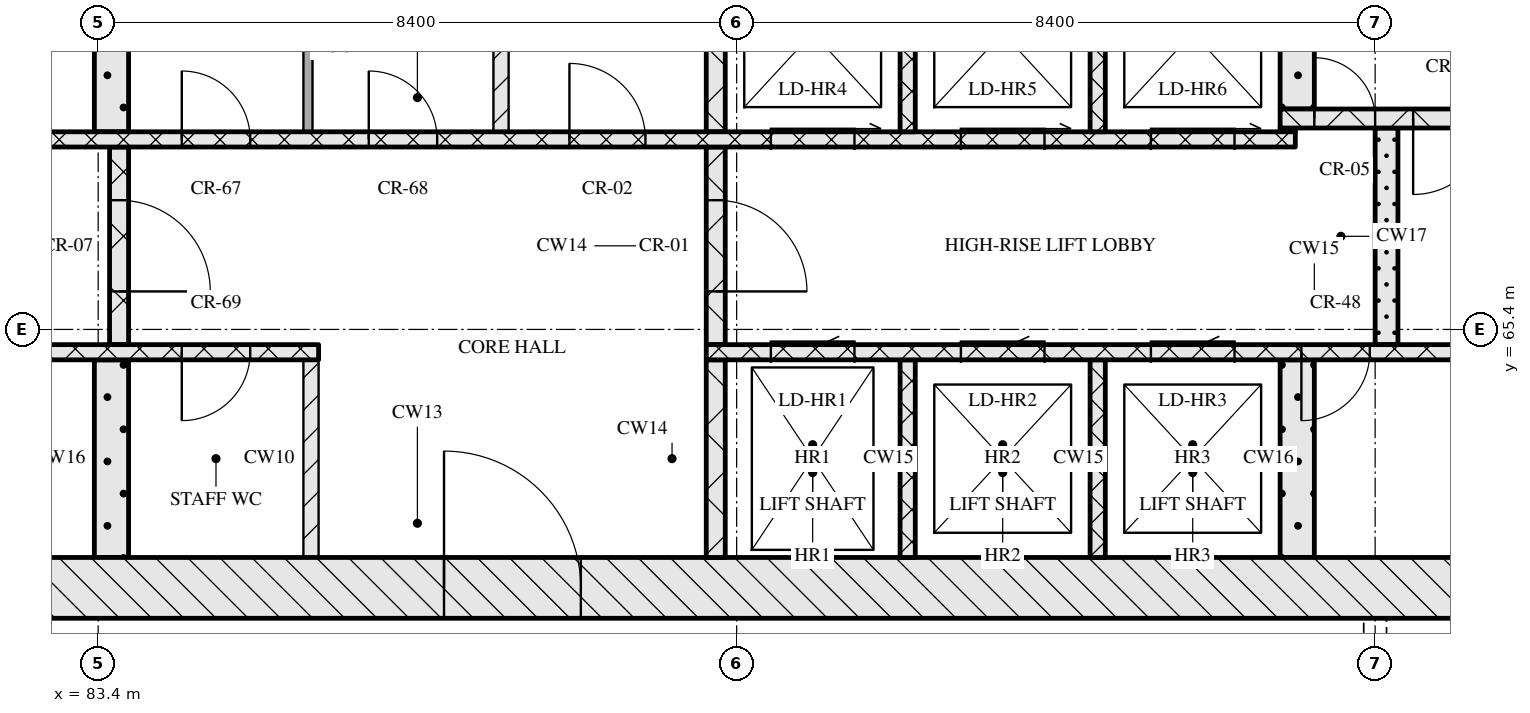
"""IFC4 building model, lengths in metres.
Left out: names, types, materials, properties, quantities, classifications, styles, units other than length and angle.
Written with IfcOpenShell. Run it as: python <this file> out.ifc"""

import sys

from ifc_helpers import new_model, si_unit, direction, frame, frame_2d, origin, place, context, subcontext, project, spatial, rectangle, extrude, element, fill, save


model = new_model("IFC4")
c1 = context("Model", 3, precision=1e-05, world=origin(), true_north=direction((0.0, 1.0)))
c2 = subcontext(c1, "Body", "Model", "MODEL_VIEW")
j1 = project(units=[si_unit("LENGTHUNIT", "METRE"), si_unit("PLANEANGLEUNIT", "RADIAN")], contexts=[c1])
p1 = place(None, origin())
s1 = spatial("IfcSite", under=j1, at=p1, CompositionType="ELEMENT")
p2 = place(p1, origin())
s2 = spatial("IfcBuilding", under=s1, at=p2, CompositionType="ELEMENT")
p3 = place(p2, frame((0.0, 0.0, 169.05)))
s3 = spatial("IfcBuildingStorey", under=s2, at=p3, CompositionType="ELEMENT", Elevation=169.05)
p4 = place(p3, frame((67.0, 62.0, 0.0), z_axis=(0.0, 0.0, 1.0), x_axis=(1.0, 0.0, 0.0)))
e1 = element("IfcWall", 1, at=p4, inside=s3, PredefinedType="SOLIDWALL", context=c2, shape_type="SweptSolid", body=[
    extrude(rectangle(XDim=41.2, YDim=0.8, at=frame_2d((20.6, 0.0))), origin(), (0.0, 0.0, 1.0), 3.32),
])
p5 = place(p4, frame((20.95, 0.0, 0.0)))
e2 = element("IfcOpeningElement", 2, at=p5, cuts=e1, PredefinedType="OPENING", context=c2, shape_type="SweptSolid", body=[
    extrude(rectangle(XDim=1.8, YDim=2.1, at=frame_2d((0.9, 1.05))), frame((0.0, 0.41, 0.0), z_axis=(0.0, -1.0, 0.0), x_axis=(1.0, 0.0, 0.0)), (0.0, 0.0, 1.0), 0.82),
])
p6 = place(p3, frame((83.575, 62.4, 0.0), z_axis=(0.0, 0.0, 1.0), x_axis=(0.0, 1.0, 0.0)))
e3 = element("IfcWall", 3, at=p6, inside=s3, PredefinedType="SOLIDWALL", context=c2, shape_type="SweptSolid", body=[
    extrude(rectangle(XDim=2.6, YDim=0.45, at=frame_2d((1.3, 0.0))), origin(), (0.0, 0.0, 1.0), 3.32),
])
p7 = place(p3, frame((86.2, 62.4, 0.0), z_axis=(0.0, 0.0, 1.0), x_axis=(0.0, 1.0, 0.0)))
e4 = element("IfcWall", 4, at=p7, inside=s3, PredefinedType="PARTITIONING", context=c2, shape_type="SweptSolid", body=[
    extrude(rectangle(XDim=2.6, YDim=0.2, at=frame_2d((1.3, 0.0))), origin(), (0.0, 0.0, 1.0), 3.32),
])
p8 = place(p3, frame((91.525, 62.4, 0.0), z_axis=(0.0, 0.0, 1.0), x_axis=(0.0, 1.0, 0.0)))
e5 = element("IfcWall", 5, at=p8, inside=s3, PredefinedType="SOLIDWALL", context=c2, shape_type="SweptSolid", body=[
    extrude(rectangle(XDim=2.6, YDim=0.25, at=frame_2d((1.3, 0.0))), origin(), (0.0, 0.0, 1.0), 3.32),
])
for number, where, z_axis, x_axis in (
    (6, (94.05, 62.4, 0.0), (0.0, 0.0, 1.0), (0.0, 1.0, 0.0)),
    (7, (96.55, 62.4, 0.0), (0.0, 0.0, 1.0), (0.0, 1.0, 0.0)),
):
    element("IfcWall", number, at=place(p3, frame(where, z_axis=z_axis, x_axis=x_axis)), inside=s3, PredefinedType="SOLIDWALL", context=c2, shape_type="SweptSolid", body=[
        extrude(rectangle(XDim=2.6, YDim=0.2, at=frame_2d((1.3, 0.0))), origin(), (0.0, 0.0, 1.0), 3.32),
    ])
p9 = place(p3, frame((99.175, 62.4, 0.0), z_axis=(0.0, 0.0, 1.0), x_axis=(0.0, 1.0, 0.0)))
e8 = element("IfcWall", 8, at=p9, inside=s3, PredefinedType="SOLIDWALL", context=c2, shape_type="SweptSolid", body=[
    extrude(rectangle(XDim=2.6, YDim=0.45, at=frame_2d((1.3, 0.0))), origin(), (0.0, 0.0, 1.0), 3.32),
])
p10 = place(p3, frame((67.8, 65.1, 0.0), z_axis=(0.0, 0.0, 1.0), x_axis=(1.0, 0.0, 0.0)))
e9 = element("IfcWall", 9, at=p10, inside=s3, PredefinedType="SOLIDWALL", context=c2, shape_type="SweptSolid", body=[
    extrude(rectangle(XDim=18.5, YDim=0.2, at=frame_2d((9.25, 0.0))), origin(), (0.0, 0.0, 1.0), 3.32),
])
p11 = place(p10, frame((7.27, 0.0, 0.0)))
e10 = element("IfcOpeningElement", 10, at=p11, cuts=e9, PredefinedType="OPENING", context=c2, shape_type="SweptSolid", body=[
    extrude(rectangle(XDim=0.9, YDim=2.1, at=frame_2d((0.45, 1.05))), frame((0.0, 0.11, 0.0), z_axis=(0.0, -1.0, 0.0), x_axis=(1.0, 0.0, 0.0)), (0.0, 0.0, 1.0), 0.22),
])
p12 = place(p10, frame((9.05, 0.0, 0.0)))
e11 = element("IfcOpeningElement", 11, at=p12, cuts=e9, PredefinedType="OPENING", context=c2, shape_type="SweptSolid", body=[
    extrude(rectangle(XDim=0.9, YDim=2.1, at=frame_2d((0.45, 1.05))), frame((0.0, 0.11, 0.0), z_axis=(0.0, -1.0, 0.0), x_axis=(1.0, 0.0, 0.0)), (0.0, 0.0, 1.0), 0.22),
])
p13 = place(p10, frame((12.76, 0.0, 0.0)))
e12 = element("IfcOpeningElement", 12, at=p13, cuts=e9, PredefinedType="OPENING", context=c2, shape_type="SweptSolid", body=[
    extrude(rectangle(XDim=0.9, YDim=2.1, at=frame_2d((0.45, 1.05))), frame((0.0, 0.11, 0.0), z_axis=(0.0, -1.0, 0.0), x_axis=(1.0, 0.0, 0.0)), (0.0, 0.0, 1.0), 0.22),
])
p14 = place(p10, frame((16.7, 0.0, 0.0)))
e13 = element("IfcOpeningElement", 13, at=p14, cuts=e9, PredefinedType="OPENING", context=c2, shape_type="SweptSolid", body=[
    extrude(rectangle(XDim=0.9, YDim=2.1, at=frame_2d((0.45, 1.05))), frame((0.0, 0.11, 0.0), z_axis=(0.0, -1.0, 0.0), x_axis=(1.0, 0.0, 0.0)), (0.0, 0.0, 1.0), 0.22),
])
p15 = place(p3, frame((91.4, 65.1, 0.0), z_axis=(0.0, 0.0, 1.0), x_axis=(1.0, 0.0, 0.0)))
e14 = element("IfcWall", 14, at=p15, inside=s3, PredefinedType="SOLIDWALL", context=c2, shape_type="SweptSolid", body=[
    extrude(rectangle(XDim=16.0, YDim=0.2, at=frame_2d((8.0, 0.0))), origin(), (0.0, 0.0, 1.0), 3.32),
])
p16 = place(p15, frame((0.85, 0.0, 0.0)))
e15 = element("IfcOpeningElement", 15, at=p16, cuts=e14, PredefinedType="OPENING", context=c2, shape_type="SweptSolid", body=[
    extrude(rectangle(XDim=1.1, YDim=2.1, at=frame_2d((0.55, 1.05))), frame((0.0, 0.11, 0.0), z_axis=(0.0, -1.0, 0.0), x_axis=(1.0, 0.0, 0.0)), (0.0, 0.0, 1.0), 0.22),
])
p17 = place(p15, frame((3.35, 0.0, 0.0)))
e16 = element("IfcOpeningElement", 16, at=p17, cuts=e14, PredefinedType="OPENING", context=c2, shape_type="SweptSolid", body=[
    extrude(rectangle(XDim=1.1, YDim=2.1, at=frame_2d((0.55, 1.05))), frame((0.0, 0.11, 0.0), z_axis=(0.0, -1.0, 0.0), x_axis=(1.0, 0.0, 0.0)), (0.0, 0.0, 1.0), 0.22),
])
p18 = place(p15, frame((5.85, 0.0, 0.0)))
e17 = element("IfcOpeningElement", 17, at=p18, cuts=e14, PredefinedType="OPENING", context=c2, shape_type="SweptSolid", body=[
    extrude(rectangle(XDim=1.1, YDim=2.1, at=frame_2d((0.55, 1.05))), frame((0.0, 0.11, 0.0), z_axis=(0.0, -1.0, 0.0), x_axis=(1.0, 0.0, 0.0)), (0.0, 0.0, 1.0), 0.22),
])
p19 = place(p15, frame((7.83, 0.0, 0.0)))
e18 = element("IfcOpeningElement", 18, at=p19, cuts=e14, PredefinedType="OPENING", context=c2, shape_type="SweptSolid", body=[
    extrude(rectangle(XDim=0.9, YDim=2.1, at=frame_2d((0.45, 1.05))), frame((0.0, 0.11, 0.0), z_axis=(0.0, -1.0, 0.0), x_axis=(1.0, 0.0, 0.0)), (0.0, 0.0, 1.0), 0.22),
])
p20 = place(p3, frame((83.675, 65.2, 0.0), z_axis=(0.0, 0.0, 1.0), x_axis=(0.0, 1.0, 0.0)))
e19 = element("IfcWall", 19, at=p20, inside=s3, PredefinedType="SOLIDWALL", context=c2, shape_type="SweptSolid", body=[
    extrude(rectangle(XDim=2.6, YDim=0.25, at=frame_2d((1.3, 0.0))), origin(), (0.0, 0.0, 1.0), 3.32),
])
p21 = place(p20, frame((0.7, 0.0, 0.0)))
e20 = element("IfcOpeningElement", 20, at=p21, cuts=e19, PredefinedType="OPENING", context=c2, shape_type="SweptSolid", body=[
    extrude(rectangle(XDim=1.2, YDim=2.1, at=frame_2d((0.6, 1.05))), frame((0.0, 0.135, 0.0), z_axis=(0.0, -1.0, 0.0), x_axis=(1.0, 0.0, 0.0)), (0.0, 0.0, 1.0), 0.27),
])
p22 = place(p3, frame((91.525, 65.2, 0.0), z_axis=(0.0, 0.0, 1.0), x_axis=(0.0, 1.0, 0.0)))
e21 = element("IfcWall", 21, at=p22, inside=s3, PredefinedType="SOLIDWALL", context=c2, shape_type="SweptSolid", body=[
    extrude(rectangle(XDim=2.6, YDim=0.25, at=frame_2d((1.3, 0.0))), origin(), (0.0, 0.0, 1.0), 3.32),
])
p23 = place(p22, frame((0.7, 0.0, 0.0)))
e22 = element("IfcOpeningElement", 22, at=p23, cuts=e21, PredefinedType="OPENING", context=c2, shape_type="SweptSolid", body=[
    extrude(rectangle(XDim=1.2, YDim=2.1, at=frame_2d((0.6, 1.05))), frame((0.0, 0.135, 0.0), z_axis=(0.0, -1.0, 0.0), x_axis=(1.0, 0.0, 0.0)), (0.0, 0.0, 1.0), 0.27),
])
p24 = place(p3, frame((100.35, 65.2, 0.0), z_axis=(0.0, 0.0, 1.0), x_axis=(0.0, 1.0, 0.0)))
e23 = element("IfcWall", 23, at=p24, inside=s3, PredefinedType="SOLIDWALL", context=c2, shape_type="SweptSolid", body=[
    extrude(rectangle(XDim=2.85, YDim=0.3, at=frame_2d((1.425, 0.0))), origin(), (0.0, 0.0, 1.0), 3.32),
])
p25 = place(p3, frame((76.05, 67.9, 0.0), z_axis=(0.0, 0.0, 1.0), x_axis=(1.0, 0.0, 0.0)))
e24 = element("IfcWall", 24, at=p25, inside=s3, PredefinedType="SOLIDWALL", context=c2, shape_type="SweptSolid", body=[
    extrude(rectangle(XDim=23.1, YDim=0.2, at=frame_2d((11.55, 0.0))), origin(), (0.0, 0.0, 1.0), 3.32),
])
p26 = place(p25, frame((1.35, 0.0, 0.0)))
e25 = element("IfcOpeningElement", 25, at=p26, cuts=e24, PredefinedType="OPENING", context=c2, shape_type="SweptSolid", body=[
    extrude(rectangle(XDim=0.9, YDim=2.1, at=frame_2d((0.45, 1.05))), frame((0.0, 0.11, 0.0), z_axis=(0.0, -1.0, 0.0), x_axis=(1.0, 0.0, 0.0)), (0.0, 0.0, 1.0), 0.22),
])
p27 = place(p25, frame((5.06, 0.0, 0.0)))
e26 = element("IfcOpeningElement", 26, at=p27, cuts=e24, PredefinedType="OPENING", context=c2, shape_type="SweptSolid", body=[
    extrude(rectangle(XDim=0.9, YDim=2.1, at=frame_2d((0.45, 1.05))), frame((0.0, 0.11, 0.0), z_axis=(0.0, -1.0, 0.0), x_axis=(1.0, 0.0, 0.0)), (0.0, 0.0, 1.0), 0.22),
])
p28 = place(p25, frame((8.45, 0.0, 0.0)))
e27 = element("IfcOpeningElement", 27, at=p28, cuts=e24, PredefinedType="OPENING", context=c2, shape_type="SweptSolid", body=[
    extrude(rectangle(XDim=0.9, YDim=2.1, at=frame_2d((0.45, 1.05))), frame((0.0, 0.11, 0.0), z_axis=(0.0, -1.0, 0.0), x_axis=(1.0, 0.0, 0.0)), (0.0, 0.0, 1.0), 0.22),
])
p29 = place(p25, frame((10.91, 0.0, 0.0)))
e28 = element("IfcOpeningElement", 28, at=p29, cuts=e24, PredefinedType="OPENING", context=c2, shape_type="SweptSolid", body=[
    extrude(rectangle(XDim=0.9, YDim=2.1, at=frame_2d((0.45, 1.05))), frame((0.0, 0.11, 0.0), z_axis=(0.0, -1.0, 0.0), x_axis=(1.0, 0.0, 0.0)), (0.0, 0.0, 1.0), 0.22),
])
p30 = place(p25, frame((13.55, 0.0, 0.0)))
e29 = element("IfcOpeningElement", 29, at=p30, cuts=e24, PredefinedType="OPENING", context=c2, shape_type="SweptSolid", body=[
    extrude(rectangle(XDim=1.0, YDim=2.1, at=frame_2d((0.5, 1.05))), frame((0.0, 0.11, 0.0), z_axis=(0.0, -1.0, 0.0), x_axis=(1.0, 0.0, 0.0)), (0.0, 0.0, 1.0), 0.22),
])
p31 = place(p25, frame((16.2, 0.0, 0.0)))
e30 = element("IfcOpeningElement", 30, at=p31, cuts=e24, PredefinedType="OPENING", context=c2, shape_type="SweptSolid", body=[
    extrude(rectangle(XDim=1.1, YDim=2.1, at=frame_2d((0.55, 1.05))), frame((0.0, 0.11, 0.0), z_axis=(0.0, -1.0, 0.0), x_axis=(1.0, 0.0, 0.0)), (0.0, 0.0, 1.0), 0.22),
])
p32 = place(p25, frame((18.7, 0.0, 0.0)))
e31 = element("IfcOpeningElement", 31, at=p32, cuts=e24, PredefinedType="OPENING", context=c2, shape_type="SweptSolid", body=[
    extrude(rectangle(XDim=1.1, YDim=2.1, at=frame_2d((0.55, 1.05))), frame((0.0, 0.11, 0.0), z_axis=(0.0, -1.0, 0.0), x_axis=(1.0, 0.0, 0.0)), (0.0, 0.0, 1.0), 0.22),
])
p33 = place(p25, frame((21.2, 0.0, 0.0)))
e32 = element("IfcOpeningElement", 32, at=p33, cuts=e24, PredefinedType="OPENING", context=c2, shape_type="SweptSolid", body=[
    extrude(rectangle(XDim=1.1, YDim=2.1, at=frame_2d((0.55, 1.05))), frame((0.0, 0.11, 0.0), z_axis=(0.0, -1.0, 0.0), x_axis=(1.0, 0.0, 0.0)), (0.0, 0.0, 1.0), 0.22),
])
p34 = place(p3, frame((83.575, 68.0, 0.0), z_axis=(0.0, 0.0, 1.0), x_axis=(0.0, 1.0, 0.0)))
e33 = element("IfcWall", 33, at=p34, inside=s3, PredefinedType="SOLIDWALL", context=c2, shape_type="SweptSolid", body=[
    extrude(rectangle(XDim=2.6, YDim=0.45, at=frame_2d((1.3, 0.0))), origin(), (0.0, 0.0, 1.0), 3.32),
])
p35 = place(p3, frame((86.16, 68.0, 0.0), z_axis=(0.0, 0.0, 1.0), x_axis=(0.0, 1.0, 0.0)))
e34 = element("IfcWall", 34, at=p35, inside=s3, PredefinedType="PARTITIONING", context=c2, shape_type="SweptSolid", body=[
    extrude(rectangle(XDim=2.6, YDim=0.12, at=frame_2d((1.3, 0.0))), origin(), (0.0, 0.0, 1.0), 3.32),
])
p36 = place(p3, frame((88.7, 68.0, 0.0), z_axis=(0.0, 0.0, 1.0), x_axis=(0.0, 1.0, 0.0)))
e35 = element("IfcWall", 35, at=p36, inside=s3, PredefinedType="PARTITIONING", context=c2, shape_type="SweptSolid", body=[
    extrude(rectangle(XDim=2.6, YDim=0.2, at=frame_2d((1.3, 0.0))), origin(), (0.0, 0.0, 1.0), 3.32),
])
p37 = place(p3, frame((91.525, 68.0, 0.0), z_axis=(0.0, 0.0, 1.0), x_axis=(0.0, 1.0, 0.0)))
e36 = element("IfcWall", 36, at=p37, inside=s3, PredefinedType="SOLIDWALL", context=c2, shape_type="SweptSolid", body=[
    extrude(rectangle(XDim=2.6, YDim=0.25, at=frame_2d((1.3, 0.0))), origin(), (0.0, 0.0, 1.0), 3.32),
])
for number, where, z_axis, x_axis in (
    (37, (94.05, 68.0, 0.0), (0.0, 0.0, 1.0), (0.0, 1.0, 0.0)),
    (38, (96.55, 68.0, 0.0), (0.0, 0.0, 1.0), (0.0, 1.0, 0.0)),
):
    element("IfcWall", number, at=place(p3, frame(where, z_axis=z_axis, x_axis=x_axis)), inside=s3, PredefinedType="SOLIDWALL", context=c2, shape_type="SweptSolid", body=[
        extrude(rectangle(XDim=2.6, YDim=0.2, at=frame_2d((1.3, 0.0))), origin(), (0.0, 0.0, 1.0), 3.32),
    ])
p38 = place(p3, frame((98.95, 68.025, 0.0), z_axis=(0.0, 0.0, 1.0), x_axis=(1.0, 0.0, 0.0)))
e39 = element("IfcWall", 39, at=p38, inside=s3, PredefinedType="SOLIDWALL", context=c2, shape_type="SweptSolid", body=[
    extrude(rectangle(XDim=0.2, YDim=0.05, at=frame_2d((0.1, 0.0))), origin(), (0.0, 0.0, 1.0), 3.32),
])
p39 = place(p3, frame((98.95, 68.175, 0.0), z_axis=(0.0, 0.0, 1.0), x_axis=(1.0, 0.0, 0.0)))
e40 = element("IfcWall", 40, at=p39, inside=s3, PredefinedType="SOLIDWALL", context=c2, shape_type="SweptSolid", body=[
    extrude(rectangle(XDim=8.45, YDim=0.25, at=frame_2d((4.225, 0.0))), origin(), (0.0, 0.0, 1.0), 3.32),
])
p40 = place(p39, frame((0.45, 0.0, 0.0)))
e41 = element("IfcOpeningElement", 41, at=p40, cuts=e40, PredefinedType="OPENING", context=c2, shape_type="SweptSolid", body=[
    extrude(rectangle(XDim=0.8, YDim=2.1, at=frame_2d((0.4, 1.05))), frame((0.0, 0.135, 0.0), z_axis=(0.0, -1.0, 0.0), x_axis=(1.0, 0.0, 0.0)), (0.0, 0.0, 1.0), 0.27),
])
p41 = place(p39, frame((1.75, 0.0, 0.0)))
e42 = element("IfcOpeningElement", 42, at=p41, cuts=e40, PredefinedType="OPENING", context=c2, shape_type="SweptSolid", body=[
    extrude(rectangle(XDim=1.0, YDim=2.1, at=frame_2d((0.5, 1.05))), frame((0.0, 0.135, 0.0), z_axis=(0.0, -1.0, 0.0), x_axis=(1.0, 0.0, 0.0)), (0.0, 0.0, 1.0), 0.27),
])
p42 = place(p3, frame((99.175, 68.3, 0.0), z_axis=(0.0, 0.0, 1.0), x_axis=(0.0, 1.0, 0.0)))
e43 = element("IfcWall", 43, at=p42, inside=s3, PredefinedType="SOLIDWALL", context=c2, shape_type="SweptSolid", body=[
    extrude(rectangle(XDim=2.3, YDim=0.45, at=frame_2d((1.15, 0.0))), origin(), (0.0, 0.0, 1.0), 3.32),
])
p43 = place(p5, origin())
e44 = element("IfcDoor", 44, at=p43, inside=s3, OperationType="DOUBLE_DOOR_SINGLE_SWING", PredefinedType="DOOR", context=c2, shape_type="SweptSolid", body=[
    extrude(rectangle(XDim=1.8, YDim=2.1, at=frame_2d((0.9, 1.05))), frame((0.0, 0.025, 0.0), z_axis=(0.0, -1.0, 0.0), x_axis=(1.0, 0.0, 0.0)), (0.0, 0.0, 1.0), 0.05),
])
fill(e2, e44)
p44 = place(p14, origin())
e45 = element("IfcDoor", 45, at=p44, inside=s3, OperationType="SINGLE_SWING_RIGHT", PredefinedType="DOOR", context=c2, shape_type="SweptSolid", body=[
    extrude(rectangle(XDim=0.9, YDim=2.1, at=frame_2d((0.45, 1.05))), frame((0.0, 0.025, 0.0), z_axis=(0.0, -1.0, 0.0), x_axis=(1.0, 0.0, 0.0)), (0.0, 0.0, 1.0), 0.05),
])
fill(e13, e45)
p45 = place(p16, origin())
e46 = element("IfcDoor", 46, at=p45, inside=s3, OperationType="SLIDING_TO_LEFT", PredefinedType="DOOR", context=c2, shape_type="SweptSolid", body=[
    extrude(rectangle(XDim=1.1, YDim=2.1, at=frame_2d((0.55, 1.05))), frame((0.0, 0.025, 0.0), z_axis=(0.0, -1.0, 0.0), x_axis=(1.0, 0.0, 0.0)), (0.0, 0.0, 1.0), 0.05),
])
fill(e15, e46)
p46 = place(p17, origin())
e47 = element("IfcDoor", 47, at=p46, inside=s3, OperationType="SLIDING_TO_LEFT", PredefinedType="DOOR", context=c2, shape_type="SweptSolid", body=[
    extrude(rectangle(XDim=1.1, YDim=2.1, at=frame_2d((0.55, 1.05))), frame((0.0, 0.025, 0.0), z_axis=(0.0, -1.0, 0.0), x_axis=(1.0, 0.0, 0.0)), (0.0, 0.0, 1.0), 0.05),
])
fill(e16, e47)
p47 = place(p18, origin())
e48 = element("IfcDoor", 48, at=p47, inside=s3, OperationType="SLIDING_TO_LEFT", PredefinedType="DOOR", context=c2, shape_type="SweptSolid", body=[
    extrude(rectangle(XDim=1.1, YDim=2.1, at=frame_2d((0.55, 1.05))), frame((0.0, 0.025, 0.0), z_axis=(0.0, -1.0, 0.0), x_axis=(1.0, 0.0, 0.0)), (0.0, 0.0, 1.0), 0.05),
])
fill(e17, e48)
p48 = place(p19, origin())
e49 = element("IfcDoor", 49, at=p48, inside=s3, OperationType="SINGLE_SWING_RIGHT", PredefinedType="DOOR", context=c2, shape_type="SweptSolid", body=[
    extrude(rectangle(XDim=0.9, YDim=2.1, at=frame_2d((0.45, 1.05))), frame((0.0, 0.025, 0.0), z_axis=(0.0, -1.0, 0.0), x_axis=(1.0, 0.0, 0.0)), (0.0, 0.0, 1.0), 0.05),
])
fill(e18, e49)
p49 = place(p21, origin())
e50 = element("IfcDoor", 50, at=p49, inside=s3, OperationType="SINGLE_SWING_RIGHT", PredefinedType="DOOR", context=c2, shape_type="SweptSolid", body=[
    extrude(rectangle(XDim=1.2, YDim=2.1, at=frame_2d((0.6, 1.05))), frame((0.0, 0.025, 0.0), z_axis=(0.0, -1.0, 0.0), x_axis=(1.0, 0.0, 0.0)), (0.0, 0.0, 1.0), 0.05),
])
fill(e20, e50)
p50 = place(p23, origin())
e51 = element("IfcDoor", 51, at=p50, inside=s3, OperationType="SINGLE_SWING_RIGHT", PredefinedType="DOOR", context=c2, shape_type="SweptSolid", body=[
    extrude(rectangle(XDim=1.2, YDim=2.1, at=frame_2d((0.6, 1.05))), frame((0.0, 0.025, 0.0), z_axis=(0.0, -1.0, 0.0), x_axis=(1.0, 0.0, 0.0)), (0.0, 0.0, 1.0), 0.05),
])
fill(e22, e51)
p51 = place(p28, origin())
e52 = element("IfcDoor", 52, at=p51, inside=s3, OperationType="SINGLE_SWING_LEFT", PredefinedType="DOOR", context=c2, shape_type="SweptSolid", body=[
    extrude(rectangle(XDim=0.9, YDim=2.1, at=frame_2d((0.45, 1.05))), frame((0.0, 0.025, 0.0), z_axis=(0.0, -1.0, 0.0), x_axis=(1.0, 0.0, 0.0)), (0.0, 0.0, 1.0), 0.05),
])
fill(e27, e52)
p52 = place(p29, origin())
e53 = element("IfcDoor", 53, at=p52, inside=s3, OperationType="SINGLE_SWING_LEFT", PredefinedType="DOOR", context=c2, shape_type="SweptSolid", body=[
    extrude(rectangle(XDim=0.9, YDim=2.1, at=frame_2d((0.45, 1.05))), frame((0.0, 0.025, 0.0), z_axis=(0.0, -1.0, 0.0), x_axis=(1.0, 0.0, 0.0)), (0.0, 0.0, 1.0), 0.05),
])
fill(e28, e53)
p53 = place(p30, origin())
e54 = element("IfcDoor", 54, at=p53, inside=s3, OperationType="SINGLE_SWING_LEFT", PredefinedType="DOOR", context=c2, shape_type="SweptSolid", body=[
    extrude(rectangle(XDim=1.0, YDim=2.1, at=frame_2d((0.5, 1.05))), frame((0.0, 0.025, 0.0), z_axis=(0.0, -1.0, 0.0), x_axis=(1.0, 0.0, 0.0)), (0.0, 0.0, 1.0), 0.05),
])
fill(e29, e54)
p54 = place(p31, origin())
e55 = element("IfcDoor", 55, at=p54, inside=s3, OperationType="SLIDING_TO_RIGHT", PredefinedType="DOOR", context=c2, shape_type="SweptSolid", body=[
    extrude(rectangle(XDim=1.1, YDim=2.1, at=frame_2d((0.55, 1.05))), frame((0.0, 0.025, 0.0), z_axis=(0.0, -1.0, 0.0), x_axis=(1.0, 0.0, 0.0)), (0.0, 0.0, 1.0), 0.05),
])
fill(e30, e55)
p55 = place(p32, origin())
e56 = element("IfcDoor", 56, at=p55, inside=s3, OperationType="SLIDING_TO_RIGHT", PredefinedType="DOOR", context=c2, shape_type="SweptSolid", body=[
    extrude(rectangle(XDim=1.1, YDim=2.1, at=frame_2d((0.55, 1.05))), frame((0.0, 0.025, 0.0), z_axis=(0.0, -1.0, 0.0), x_axis=(1.0, 0.0, 0.0)), (0.0, 0.0, 1.0), 0.05),
])
fill(e31, e56)
p56 = place(p33, origin())
e57 = element("IfcDoor", 57, at=p56, inside=s3, OperationType="SLIDING_TO_RIGHT", PredefinedType="DOOR", context=c2, shape_type="SweptSolid", body=[
    extrude(rectangle(XDim=1.1, YDim=2.1, at=frame_2d((0.55, 1.05))), frame((0.0, 0.025, 0.0), z_axis=(0.0, -1.0, 0.0), x_axis=(1.0, 0.0, 0.0)), (0.0, 0.0, 1.0), 0.05),
])
fill(e32, e57)
p57 = place(p40, origin())
e58 = element("IfcDoor", 58, at=p57, inside=s3, OperationType="SINGLE_SWING_LEFT", PredefinedType="DOOR", context=c2, shape_type="SweptSolid", body=[
    extrude(rectangle(XDim=0.8, YDim=2.1, at=frame_2d((0.4, 1.05))), frame((0.0, 0.025, 0.0), z_axis=(0.0, -1.0, 0.0), x_axis=(1.0, 0.0, 0.0)), (0.0, 0.0, 1.0), 0.05),
])
fill(e41, e58)
p58 = place(p41, origin())
e59 = element("IfcDoor", 59, at=p58, inside=s3, OperationType="SINGLE_SWING_RIGHT", PredefinedType="DOOR", context=c2, shape_type="SweptSolid", body=[
    extrude(rectangle(XDim=1.0, YDim=2.1, at=frame_2d((0.5, 1.05))), frame((0.0, 0.025, 0.0), z_axis=(0.0, -1.0, 0.0), x_axis=(1.0, 0.0, 0.0)), (0.0, 0.0, 1.0), 0.05),
])
fill(e42, e59)
save(model, sys.argv[1])
